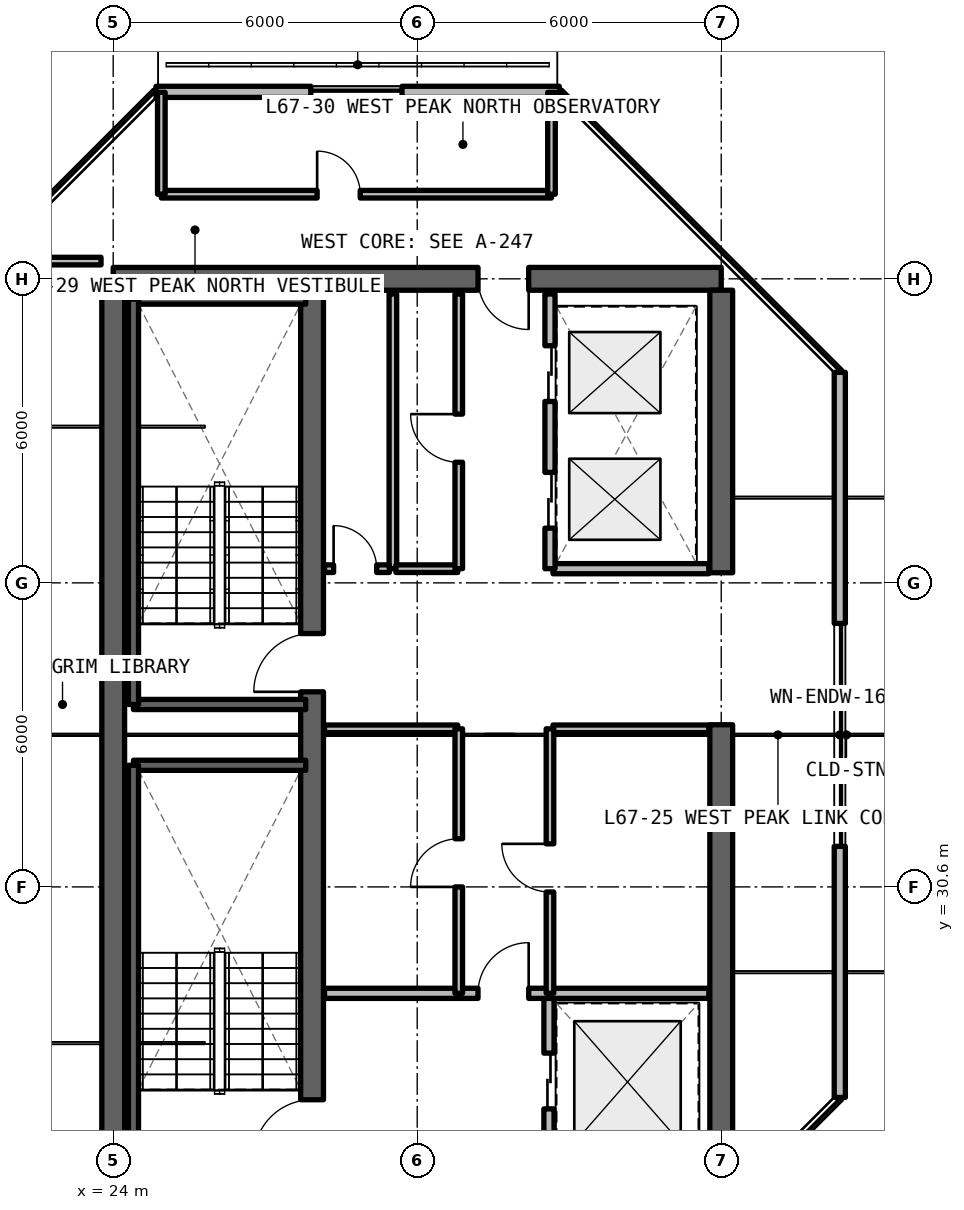
"""IFC4 building model, lengths in metres.
Left out: names, types, materials, properties, quantities, classifications, styles, units other than length and angle.
Written with IfcOpenShell. Run it as: python <this file> out.ifc"""

import sys

from ifc_helpers import new_model, si_unit, direction, frame, frame_2d, origin, place, context, subcontext, project, spatial, rectangle, extrude, element, fill, save


model = new_model("IFC4")
c1 = context("Model", 3, precision=1e-05, world=origin(), true_north=direction((0.0, 1.0)))
c2 = subcontext(c1, "Body", "Model", "MODEL_VIEW")
j1 = project(units=[si_unit("LENGTHUNIT", "METRE"), si_unit("PLANEANGLEUNIT", "RADIAN")], contexts=[c1])
p1 = place(None, origin())
s1 = spatial("IfcSite", under=j1, at=p1, CompositionType="ELEMENT")
p2 = place(p1, origin())
s2 = spatial("IfcBuilding", under=s1, at=p2, CompositionType="ELEMENT")
p3 = place(p2, frame((0.0, 0.0, 239.25)))
s3 = spatial("IfcBuildingStorey", under=s2, at=p3, CompositionType="ELEMENT", Elevation=239.25)
p4 = place(p3, frame((36.0, 42.6, 0.0), z_axis=(0.0, 0.0, 1.0), x_axis=(-1.0, 0.0, 0.0)))
e1 = element("IfcWall", 1, at=p4, inside=s3, PredefinedType="SHEAR", context=c2, shape_type="SweptSolid", body=[
    extrude(rectangle(XDim=12.0, YDim=0.45, at=frame_2d((6.0, 0.0))), origin(), (0.0, 0.0, 1.0), 3.3),
])
p5 = place(p4, frame((3.8, 0.0, 0.0)))
e2 = element("IfcOpeningElement", 2, at=p5, cuts=e1, PredefinedType="OPENING", context=c2, shape_type="SweptSolid", body=[
    extrude(rectangle(XDim=1.0, YDim=2.15, at=frame_2d((0.5, 1.075))), frame((0.0, 0.235, 0.0), z_axis=(0.0, -1.0, 0.0), x_axis=(1.0, 0.0, 0.0)), (0.0, 0.0, 1.0), 0.47),
])
p6 = place(p3, frame((24.0, 24.825, 0.0), z_axis=(0.0, 0.0, 1.0), x_axis=(0.0, 1.0, 0.0)))
e3 = element("IfcWall", 3, at=p6, inside=s3, PredefinedType="SHEAR", context=c2, shape_type="SweptSolid", body=[
    extrude(rectangle(XDim=17.55, YDim=0.45, at=frame_2d((8.775, 0.0))), origin(), (0.0, 0.0, 1.0), 3.3),
])
p7 = place(p3, frame((36.0, 24.825, 0.0), z_axis=(0.0, 0.0, 1.0), x_axis=(0.0, 1.0, 0.0)))
e4 = element("IfcWall", 4, at=p7, inside=s3, PredefinedType="SHEAR", context=c2, shape_type="SweptSolid", body=[
    extrude(rectangle(XDim=8.975, YDim=0.45, at=frame_2d((4.488, 0.0))), origin(), (0.0, 0.0, 1.0), 3.3),
])
p8 = place(p3, frame((36.0, 36.8, 0.0), z_axis=(0.0, 0.0, 1.0), x_axis=(0.0, 1.0, 0.0)))
e5 = element("IfcWall", 5, at=p8, inside=s3, PredefinedType="SHEAR", context=c2, shape_type="SweptSolid", body=[
    extrude(rectangle(XDim=5.575, YDim=0.45, at=frame_2d((2.788, 0.0))), origin(), (0.0, 0.0, 1.0), 3.3),
])
p9 = place(p3, frame((27.925, 24.825, 0.0), z_axis=(0.0, 0.0, 1.0), x_axis=(0.0, 1.0, 0.0)))
e6 = element("IfcWall", 6, at=p9, inside=s3, PredefinedType="SHEAR", context=c2, shape_type="SweptSolid", body=[
    extrude(rectangle(XDim=17.55, YDim=0.45, at=frame_2d((8.775, 0.0))), origin(), (0.0, 0.0, 1.0), 3.3),
])
p10 = place(p9, frame((0.425, 0.0, 0.0)))
e7 = element("IfcOpeningElement", 7, at=p10, cuts=e6, PredefinedType="OPENING", context=c2, shape_type="SweptSolid", body=[
    extrude(rectangle(XDim=1.15, YDim=2.15, at=frame_2d((0.575, 1.075))), frame((0.0, 0.235, 0.0), z_axis=(0.0, -1.0, 0.0), x_axis=(1.0, 0.0, 0.0)), (0.0, 0.0, 1.0), 0.47),
])
p11 = place(p9, frame((9.625, 0.0, 0.0)))
e8 = element("IfcOpeningElement", 8, at=p11, cuts=e6, PredefinedType="OPENING", context=c2, shape_type="SweptSolid", body=[
    extrude(rectangle(XDim=1.15, YDim=2.15, at=frame_2d((0.575, 1.075))), frame((0.0, 0.235, 0.0), z_axis=(0.0, -1.0, 0.0), x_axis=(1.0, 0.0, 0.0)), (0.0, 0.0, 1.0), 0.47),
])
p12 = place(p3, frame((38.34, 26.446, 0.0), z_axis=(0.0, 0.0, 1.0), x_axis=(0.0, 1.0, 0.0)))
e9 = element("IfcWall", 9, at=p12, inside=s3, PredefinedType="SOLIDWALL", context=c2, shape_type="SweptSolid", body=[
    extrude(rectangle(XDim=14.309, YDim=0.22, at=frame_2d((7.154, 0.0))), origin(), (0.0, 0.0, 1.0), 3.08),
])
p13 = place(p12, frame((4.954, 0.0, 0.78)))
e10 = element("IfcOpeningElement", 10, at=p13, cuts=e9, PredefinedType="OPENING", context=c2, shape_type="SweptSolid", body=[
    extrude(rectangle(XDim=4.4, YDim=1.66, at=frame_2d((2.2, 0.83))), frame((0.0, 0.12, 0.0), z_axis=(0.0, -1.0, 0.0), x_axis=(1.0, 0.0, 0.0)), (0.0, 0.0, 1.0), 0.24),
])
p14 = place(p3, frame((32.804, 46.29, 0.0), z_axis=(0.0, 0.0, 1.0), x_axis=(-1.0, 0.0, 0.0)))
e11 = element("IfcWall", 11, at=p14, inside=s3, PredefinedType="SOLIDWALL", context=c2, shape_type="SweptSolid", body=[
    extrude(rectangle(XDim=7.959, YDim=0.22, at=frame_2d((3.979, 0.0))), origin(), (0.0, 0.0, 1.0), 3.08),
])
p15 = place(p14, frame((3.104, 0.0, 0.78)))
e12 = element("IfcOpeningElement", 12, at=p15, cuts=e11, PredefinedType="OPENING", context=c2, shape_type="SweptSolid", body=[
    extrude(rectangle(XDim=1.8, YDim=1.66, at=frame_2d((0.9, 0.83))), frame((0.0, 0.12, 0.0), z_axis=(0.0, -1.0, 0.0), x_axis=(1.0, 0.0, 0.0)), (0.0, 0.0, 1.0), 0.24),
])
p16 = place(p3, frame((32.6, 24.92, 0.0), z_axis=(0.0, 0.0, 1.0), x_axis=(0.0, 1.0, 0.0)))
e13 = element("IfcWall", 13, at=p16, inside=s3, PredefinedType="SOLIDWALL", context=c2, shape_type="SweptSolid", body=[
    extrude(rectangle(XDim=3.58, YDim=0.2, at=frame_2d((1.79, 0.0))), origin(), (0.0, 0.0, 1.0), 2.35),
])
p17 = place(p16, frame((1.3, 0.0, 0.0)))
e14 = element("IfcOpeningElement", 14, at=p17, cuts=e13, PredefinedType="OPENING", context=c2, shape_type="SweptSolid", body=[
    extrude(rectangle(XDim=1.1, YDim=2.2, at=frame_2d((0.55, 1.1))), frame((0.0, 0.11, 0.0), z_axis=(0.0, -1.0, 0.0), x_axis=(1.0, 0.0, 0.0)), (0.0, 0.0, 1.0), 0.22),
])
p18 = place(p3, frame((28.17, 28.5, 0.0), z_axis=(0.0, 0.0, 1.0), x_axis=(1.0, 0.0, 0.0)))
e15 = element("IfcWall", 15, at=p18, inside=s3, PredefinedType="SOLIDWALL", context=c2, shape_type="SweptSolid", body=[
    extrude(rectangle(XDim=7.585, YDim=0.2, at=frame_2d((3.792, 0.0))), origin(), (0.0, 0.0, 1.0), 2.35),
])
p19 = place(p18, frame((3.03, 0.0, 0.0)))
e16 = element("IfcOpeningElement", 16, at=p19, cuts=e15, PredefinedType="OPENING", context=c2, shape_type="SweptSolid", body=[
    extrude(rectangle(XDim=1.0, YDim=2.15, at=frame_2d((0.5, 1.075))), frame((0.0, 0.11, 0.0), z_axis=(0.0, -1.0, 0.0), x_axis=(1.0, 0.0, 0.0)), (0.0, 0.0, 1.0), 0.22),
])
p20 = place(p3, frame((28.17, 33.72, 0.0), z_axis=(0.0, 0.0, 1.0), x_axis=(1.0, 0.0, 0.0)))
e17 = element("IfcWall", 17, at=p20, inside=s3, PredefinedType="SOLIDWALL", context=c2, shape_type="SweptSolid", body=[
    extrude(rectangle(XDim=2.63, YDim=0.15, at=frame_2d((1.315, 0.0))), origin(), (0.0, 0.0, 1.0), 2.35),
])
p21 = place(p3, frame((30.82, 28.5, 0.0), z_axis=(0.0, 0.0, 1.0), x_axis=(0.0, 1.0, 0.0)))
e18 = element("IfcWall", 18, at=p21, inside=s3, PredefinedType="SOLIDWALL", context=c2, shape_type="SweptSolid", body=[
    extrude(rectangle(XDim=5.22, YDim=0.15, at=frame_2d((2.61, 0.0))), origin(), (0.0, 0.0, 1.0), 2.35),
])
p22 = place(p21, frame((2.1, 0.0, 0.0)))
e19 = element("IfcOpeningElement", 19, at=p22, cuts=e18, PredefinedType="OPENING", context=c2, shape_type="SweptSolid", body=[
    extrude(rectangle(XDim=0.95, YDim=2.15, at=frame_2d((0.475, 1.075))), frame((0.0, 0.085, 0.0), z_axis=(0.0, -1.0, 0.0), x_axis=(1.0, 0.0, 0.0)), (0.0, 0.0, 1.0), 0.17),
])
p23 = place(p3, frame((32.68, 33.72, 0.0), z_axis=(0.0, 0.0, 1.0), x_axis=(1.0, 0.0, 0.0)))
e20 = element("IfcWall", 20, at=p23, inside=s3, PredefinedType="SOLIDWALL", context=c2, shape_type="SweptSolid", body=[
    extrude(rectangle(XDim=3.075, YDim=0.15, at=frame_2d((1.538, 0.0))), origin(), (0.0, 0.0, 1.0), 2.35),
])
p24 = place(p3, frame((32.62, 28.5, 0.0), z_axis=(0.0, 0.0, 1.0), x_axis=(0.0, 1.0, 0.0)))
e21 = element("IfcWall", 21, at=p24, inside=s3, PredefinedType="SOLIDWALL", context=c2, shape_type="SweptSolid", body=[
    extrude(rectangle(XDim=5.22, YDim=0.15, at=frame_2d((2.61, 0.0))), origin(), (0.0, 0.0, 1.0), 2.35),
])
p25 = place(p24, frame((2.0, 0.0, 0.0)))
e22 = element("IfcOpeningElement", 22, at=p25, cuts=e21, PredefinedType="OPENING", context=c2, shape_type="SweptSolid", body=[
    extrude(rectangle(XDim=0.95, YDim=2.15, at=frame_2d((0.475, 1.075))), frame((0.0, 0.085, 0.0), z_axis=(0.0, -1.0, 0.0), x_axis=(1.0, 0.0, 0.0)), (0.0, 0.0, 1.0), 0.17),
])
p26 = place(p3, frame((29.52, 36.88, 0.0), z_axis=(0.0, 0.0, 1.0), x_axis=(0.0, 1.0, 0.0)))
e23 = element("IfcWall", 23, at=p26, inside=s3, PredefinedType="SOLIDWALL", context=c2, shape_type="SweptSolid", body=[
    extrude(rectangle(XDim=5.42, YDim=0.15, at=frame_2d((2.71, 0.0))), origin(), (0.0, 0.0, 1.0), 2.35),
])
p27 = place(p3, frame((28.17, 36.88, 0.0), z_axis=(0.0, 0.0, 1.0), x_axis=(1.0, 0.0, 0.0)))
e24 = element("IfcWall", 24, at=p27, inside=s3, PredefinedType="SOLIDWALL", context=c2, shape_type="SweptSolid", body=[
    extrude(rectangle(XDim=1.28, YDim=0.15, at=frame_2d((0.64, 0.0))), origin(), (0.0, 0.0, 1.0), 2.35),
])
p28 = place(p27, frame((0.18, 0.0, 0.0)))
e25 = element("IfcOpeningElement", 25, at=p28, cuts=e24, PredefinedType="OPENING", context=c2, shape_type="SweptSolid", body=[
    extrude(rectangle(XDim=0.85, YDim=2.1, at=frame_2d((0.425, 1.05))), frame((0.0, 0.085, 0.0), z_axis=(0.0, -1.0, 0.0), x_axis=(1.0, 0.0, 0.0)), (0.0, 0.0, 1.0), 0.17),
])
p29 = place(p3, frame((29.58, 36.88, 0.0), z_axis=(0.0, 0.0, 1.0), x_axis=(1.0, 0.0, 0.0)))
e26 = element("IfcWall", 26, at=p29, inside=s3, PredefinedType="SOLIDWALL", context=c2, shape_type="SweptSolid", body=[
    extrude(rectangle(XDim=1.22, YDim=0.15, at=frame_2d((0.61, 0.0))), origin(), (0.0, 0.0, 1.0), 2.35),
])
p30 = place(p3, frame((30.82, 36.88, 0.0), z_axis=(0.0, 0.0, 1.0), x_axis=(0.0, 1.0, 0.0)))
e27 = element("IfcWall", 27, at=p30, inside=s3, PredefinedType="SOLIDWALL", context=c2, shape_type="SweptSolid", body=[
    extrude(rectangle(XDim=5.42, YDim=0.15, at=frame_2d((2.71, 0.0))), origin(), (0.0, 0.0, 1.0), 2.35),
])
p31 = place(p30, frame((2.1, 0.0, 0.0)))
e28 = element("IfcOpeningElement", 28, at=p31, cuts=e27, PredefinedType="OPENING", context=c2, shape_type="SweptSolid", body=[
    extrude(rectangle(XDim=0.95, YDim=2.15, at=frame_2d((0.475, 1.075))), frame((0.0, 0.085, 0.0), z_axis=(0.0, -1.0, 0.0), x_axis=(1.0, 0.0, 0.0)), (0.0, 0.0, 1.0), 0.17),
])
p32 = place(p3, frame((32.68, 36.88, 0.0), z_axis=(0.0, 0.0, 1.0), x_axis=(1.0, 0.0, 0.0)))
e29 = element("IfcWall", 29, at=p32, inside=s3, PredefinedType="SOLIDWALL", context=c2, shape_type="SweptSolid", body=[
    extrude(rectangle(XDim=3.075, YDim=0.2, at=frame_2d((1.538, 0.0))), origin(), (0.0, 0.0, 1.0), 2.35),
])
p33 = place(p3, frame((32.62, 36.88, 0.0), z_axis=(0.0, 0.0, 1.0), x_axis=(0.0, 1.0, 0.0)))
e30 = element("IfcWall", 30, at=p33, inside=s3, PredefinedType="SOLIDWALL", context=c2, shape_type="SweptSolid", body=[
    extrude(rectangle(XDim=5.42, YDim=0.2, at=frame_2d((2.71, 0.0))), origin(), (0.0, 0.0, 1.0), 2.35),
])
p34 = place(p33, frame((0.8, 0.0, 0.0)))
e31 = element("IfcOpeningElement", 31, at=p34, cuts=e30, PredefinedType="OPENING", context=c2, shape_type="SweptSolid", body=[
    extrude(rectangle(XDim=1.1, YDim=2.2, at=frame_2d((0.55, 1.1))), frame((0.0, 0.11, 0.0), z_axis=(0.0, -1.0, 0.0), x_axis=(1.0, 0.0, 0.0)), (0.0, 0.0, 1.0), 0.22),
])
p35 = place(p33, frame((3.3, 0.0, 0.0)))
e32 = element("IfcOpeningElement", 32, at=p35, cuts=e30, PredefinedType="OPENING", context=c2, shape_type="SweptSolid", body=[
    extrude(rectangle(XDim=1.1, YDim=2.2, at=frame_2d((0.55, 1.1))), frame((0.0, 0.11, 0.0), z_axis=(0.0, -1.0, 0.0), x_axis=(1.0, 0.0, 0.0)), (0.0, 0.0, 1.0), 0.22),
])
p36 = place(p3, frame((22.12, 42.95, 0.0), z_axis=(0.0, 0.0, 1.0), x_axis=(1.0, 0.0, 0.0)))
e33 = element("IfcWall", 33, at=p36, inside=s3, PredefinedType="SOLIDWALL", context=c2, shape_type="SweptSolid", body=[
    extrude(rectangle(XDim=1.64, YDim=0.15, at=frame_2d((0.82, 0.0))), origin(), (0.0, 0.0, 1.0), 2.35),
])
p37 = place(p3, frame((24.95, 44.27, 0.0), z_axis=(0.0, 0.0, 1.0), x_axis=(1.0, 0.0, 0.0)))
e34 = element("IfcWall", 34, at=p37, inside=s3, PredefinedType="SOLIDWALL", context=c2, shape_type="SweptSolid", body=[
    extrude(rectangle(XDim=7.7, YDim=0.15, at=frame_2d((3.85, 0.0))), origin(), (0.0, 0.0, 1.0), 2.35),
])
p38 = place(p37, frame((3.075, 0.0, 0.0)))
e35 = element("IfcOpeningElement", 35, at=p38, cuts=e34, PredefinedType="OPENING", context=c2, shape_type="SweptSolid", body=[
    extrude(rectangle(XDim=0.85, YDim=2.1, at=frame_2d((0.425, 1.05))), frame((0.0, 0.085, 0.0), z_axis=(0.0, -1.0, 0.0), x_axis=(1.0, 0.0, 0.0)), (0.0, 0.0, 1.0), 0.17),
])
for number, where, z_axis, x_axis in (
    (36, (24.95, 44.27, 0.0), (0.0, 0.0, 1.0), (0.0, 1.0, 0.0)),
    (37, (32.65, 44.27, 0.0), (0.0, 0.0, 1.0), (0.0, 1.0, 0.0)),
):
    element("IfcWall", number, at=place(p3, frame(where, z_axis=z_axis, x_axis=x_axis)), inside=s3, PredefinedType="SOLIDWALL", context=c2, shape_type="SweptSolid", body=[
        extrude(rectangle(XDim=2.01, YDim=0.15, at=frame_2d((1.005, 0.0))), origin(), (0.0, 0.0, 1.0), 2.35),
    ])
p39 = place(p3, frame((27.8, 33.0, 0.0), z_axis=(0.0, 0.0, 1.0), x_axis=(-1.0, 0.0, 0.0)))
e38 = element("IfcWall", 38, at=p39, inside=s3, PredefinedType="SOLIDWALL", context=c2, shape_type="SweptSolid", body=[
    extrude(rectangle(XDim=3.4, YDim=0.2, at=frame_2d((1.7, 0.0))), origin(), (0.0, 0.0, 1.0), 3.3),
])
p40 = place(p3, frame((24.4, 33.0, 0.0), z_axis=(0.0, 0.0, 1.0), x_axis=(0.0, -1.0, 0.0)))
e39 = element("IfcWall", 39, at=p40, inside=s3, PredefinedType="SOLIDWALL", context=c2, shape_type="SweptSolid", body=[
    extrude(rectangle(XDim=8.0, YDim=0.2, at=frame_2d((4.0, 0.0))), origin(), (0.0, 0.0, 1.0), 3.3),
])
for number, where, z_axis, x_axis in (
    (40, (24.4, 34.2, 0.0), (0.0, 0.0, 1.0), (1.0, 0.0, 0.0)),
    (41, (27.8, 42.2, 0.0), (0.0, 0.0, 1.0), (-1.0, 0.0, 0.0)),
):
    element("IfcWall", number, at=place(p3, frame(where, z_axis=z_axis, x_axis=x_axis)), inside=s3, PredefinedType="SOLIDWALL", context=c2, shape_type="SweptSolid", body=[
        extrude(rectangle(XDim=3.4, YDim=0.2, at=frame_2d((1.7, 0.0))), origin(), (0.0, 0.0, 1.0), 3.3),
    ])
p41 = place(p3, frame((24.4, 42.2, 0.0), z_axis=(0.0, 0.0, 1.0), x_axis=(0.0, -1.0, 0.0)))
e42 = element("IfcWall", 42, at=p41, inside=s3, PredefinedType="SOLIDWALL", context=c2, shape_type="SweptSolid", body=[
    extrude(rectangle(XDim=8.0, YDim=0.2, at=frame_2d((4.0, 0.0))), origin(), (0.0, 0.0, 1.0), 3.3),
])
p42 = place(p13, origin())
e43 = element("IfcWindow", 43, at=p42, inside=s3, PartitioningType="SINGLE_PANEL", PredefinedType="WINDOW", context=c2, shape_type="SweptSolid", body=[
    extrude(rectangle(XDim=4.4, YDim=1.66, at=frame_2d((2.2, 0.83))), frame((0.0, 0.03, 0.0), z_axis=(0.0, -1.0, 0.0), x_axis=(1.0, 0.0, 0.0)), (0.0, 0.0, 1.0), 0.06),
])
fill(e10, e43)
p43 = place(p15, origin())
e44 = element("IfcWindow", 44, at=p43, inside=s3, PartitioningType="SINGLE_PANEL", PredefinedType="WINDOW", context=c2, shape_type="SweptSolid", body=[
    extrude(rectangle(XDim=1.8, YDim=1.66, at=frame_2d((0.9, 0.83))), frame((0.0, 0.03, 0.0), z_axis=(0.0, -1.0, 0.0), x_axis=(1.0, 0.0, 0.0)), (0.0, 0.0, 1.0), 0.06),
])
fill(e12, e44)
p44 = place(p17, origin())
e45 = element("IfcDoor", 45, at=p44, inside=s3, OperationType="SLIDING_TO_LEFT", PredefinedType="DOOR", context=c2, shape_type="SweptSolid", body=[
    extrude(rectangle(XDim=1.1, YDim=2.2, at=frame_2d((0.55, 1.1))), frame((0.0, 0.025, 0.0), z_axis=(0.0, -1.0, 0.0), x_axis=(1.0, 0.0, 0.0)), (0.0, 0.0, 1.0), 0.05),
])
fill(e14, e45)
p45 = place(p19, origin())
e46 = element("IfcDoor", 46, at=p45, inside=s3, OperationType="SINGLE_SWING_RIGHT", PredefinedType="DOOR", context=c2, shape_type="SweptSolid", body=[
    extrude(rectangle(XDim=1.0, YDim=2.15, at=frame_2d((0.5, 1.075))), frame((0.0, 0.025, 0.0), z_axis=(0.0, -1.0, 0.0), x_axis=(1.0, 0.0, 0.0)), (0.0, 0.0, 1.0), 0.05),
])
fill(e16, e46)
p46 = place(p22, origin())
e47 = element("IfcDoor", 47, at=p46, inside=s3, OperationType="SINGLE_SWING_LEFT", PredefinedType="DOOR", context=c2, shape_type="SweptSolid", body=[
    extrude(rectangle(XDim=0.95, YDim=2.15, at=frame_2d((0.475, 1.075))), frame((0.0, 0.025, 0.0), z_axis=(0.0, -1.0, 0.0), x_axis=(1.0, 0.0, 0.0)), (0.0, 0.0, 1.0), 0.05),
])
fill(e19, e47)
p47 = place(p25, origin())
e48 = element("IfcDoor", 48, at=p47, inside=s3, OperationType="SINGLE_SWING_RIGHT", PredefinedType="DOOR", context=c2, shape_type="SweptSolid", body=[
    extrude(rectangle(XDim=0.95, YDim=2.15, at=frame_2d((0.475, 1.075))), frame((0.0, 0.025, 0.0), z_axis=(0.0, -1.0, 0.0), x_axis=(1.0, 0.0, 0.0)), (0.0, 0.0, 1.0), 0.05),
])
fill(e22, e48)
p48 = place(p28, origin())
e49 = element("IfcDoor", 49, at=p48, inside=s3, OperationType="SINGLE_SWING_LEFT", PredefinedType="DOOR", context=c2, shape_type="SweptSolid", body=[
    extrude(rectangle(XDim=0.85, YDim=2.1, at=frame_2d((0.425, 1.05))), frame((0.0, 0.025, 0.0), z_axis=(0.0, -1.0, 0.0), x_axis=(1.0, 0.0, 0.0)), (0.0, 0.0, 1.0), 0.05),
])
fill(e25, e49)
p49 = place(p31, origin())
e50 = element("IfcDoor", 50, at=p49, inside=s3, OperationType="SINGLE_SWING_RIGHT", PredefinedType="DOOR", context=c2, shape_type="SweptSolid", body=[
    extrude(rectangle(XDim=0.95, YDim=2.15, at=frame_2d((0.475, 1.075))), frame((0.0, 0.025, 0.0), z_axis=(0.0, -1.0, 0.0), x_axis=(1.0, 0.0, 0.0)), (0.0, 0.0, 1.0), 0.05),
])
fill(e28, e50)
p50 = place(p34, origin())
e51 = element("IfcDoor", 51, at=p50, inside=s3, OperationType="SLIDING_TO_LEFT", PredefinedType="DOOR", context=c2, shape_type="SweptSolid", body=[
    extrude(rectangle(XDim=1.1, YDim=2.2, at=frame_2d((0.55, 1.1))), frame((0.0, 0.025, 0.0), z_axis=(0.0, -1.0, 0.0), x_axis=(1.0, 0.0, 0.0)), (0.0, 0.0, 1.0), 0.05),
])
fill(e31, e51)
p51 = place(p35, origin())
e52 = element("IfcDoor", 52, at=p51, inside=s3, OperationType="SLIDING_TO_RIGHT", PredefinedType="DOOR", context=c2, shape_type="SweptSolid", body=[
    extrude(rectangle(XDim=1.1, YDim=2.2, at=frame_2d((0.55, 1.1))), frame((0.0, 0.025, 0.0), z_axis=(0.0, -1.0, 0.0), x_axis=(1.0, 0.0, 0.0)), (0.0, 0.0, 1.0), 0.05),
])
fill(e32, e52)
p52 = place(p38, origin())
e53 = element("IfcDoor", 53, at=p52, inside=s3, OperationType="SINGLE_SWING_LEFT", PredefinedType="DOOR", context=c2, shape_type="SweptSolid", body=[
    extrude(rectangle(XDim=0.85, YDim=2.1, at=frame_2d((0.425, 1.05))), frame((0.0, 0.025, 0.0), z_axis=(0.0, -1.0, 0.0), x_axis=(1.0, 0.0, 0.0)), (0.0, 0.0, 1.0), 0.05),
])
fill(e35, e53)
p53 = place(p10, origin())
e54 = element("IfcDoor", 54, at=p53, inside=s3, OperationType="SINGLE_SWING_RIGHT", PredefinedType="DOOR", context=c2, shape_type="SweptSolid", body=[
    extrude(rectangle(XDim=1.15, YDim=2.15, at=frame_2d((0.575, 1.075))), frame((0.0, 0.025, 0.0), z_axis=(0.0, -1.0, 0.0), x_axis=(1.0, 0.0, 0.0)), (0.0, 0.0, 1.0), 0.05),
])
fill(e7, e54)
p54 = place(p11, origin())
e55 = element("IfcDoor", 55, at=p54, inside=s3, OperationType="SINGLE_SWING_LEFT", PredefinedType="DOOR", context=c2, shape_type="SweptSolid", body=[
    extrude(rectangle(XDim=1.15, YDim=2.15, at=frame_2d((0.575, 1.075))), frame((0.0, 0.025, 0.0), z_axis=(0.0, -1.0, 0.0), x_axis=(1.0, 0.0, 0.0)), (0.0, 0.0, 1.0), 0.05),
])
fill(e8, e55)
p55 = place(p5, origin())
e56 = element("IfcDoor", 56, at=p55, inside=s3, OperationType="SINGLE_SWING_RIGHT", PredefinedType="DOOR", context=c2, shape_type="SweptSolid", body=[
    extrude(rectangle(XDim=1.0, YDim=2.15, at=frame_2d((0.5, 1.075))), frame((0.0, 0.025, 0.0), z_axis=(0.0, -1.0, 0.0), x_axis=(1.0, 0.0, 0.0)), (0.0, 0.0, 1.0), 0.05),
])
fill(e2, e56)
save(model, sys.argv[1])
